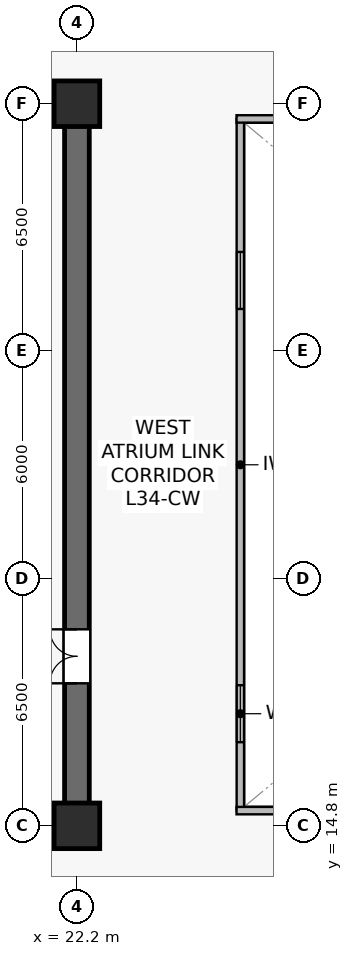
"""IFC4 building model, lengths in metres.
Left out: names, types, materials, properties, quantities, classifications, styles, units other than length and angle.
Written with IfcOpenShell. Run it as: python <this file> out.ifc"""

import sys

from ifc_helpers import new_model, si_unit, direction, frame, frame_2d, origin, origin_2d, place, context, subcontext, project, spatial, rectangle, extrude, source, transform, mapped, element, fill, save


model = new_model("IFC4")
c1 = context("Model", 3, precision=1e-05, world=origin(), true_north=direction((0.0, 1.0)))
c2 = subcontext(c1, "Body", "Model", "MODEL_VIEW")
j1 = project(units=[si_unit("LENGTHUNIT", "METRE"), si_unit("PLANEANGLEUNIT", "RADIAN")], contexts=[c1])
p1 = place(None, origin())
s1 = spatial("IfcSite", under=j1, at=p1, CompositionType="ELEMENT")
p2 = place(p1, origin())
s2 = spatial("IfcBuilding", under=s1, at=p2, CompositionType="ELEMENT")
p3 = place(p2, frame((0.0, 0.0, 142.0)))
s3 = spatial("IfcBuildingStorey", under=s2, at=p3, CompositionType="ELEMENT", Elevation=142.0)
p4 = place(p3, frame((7.075, 14.8, 0.0), z_axis=(0.0, 0.0, 1.0), x_axis=(1.0, 0.0, 0.0)))
e1 = element("IfcWall", 1, at=p4, inside=s3, PredefinedType="SHEAR", context=c2, shape_type="SweptSolid", body=[
    extrude(rectangle(XDim=15.45, YDim=0.65, at=frame_2d((7.725, 0.0))), origin(), (0.0, 0.0, 1.0), 3.79),
])
p5 = place(p3, frame((7.075, 33.8, 0.0), z_axis=(0.0, 0.0, 1.0), x_axis=(1.0, 0.0, 0.0)))
e2 = element("IfcWall", 2, at=p5, inside=s3, PredefinedType="SHEAR", context=c2, shape_type="SweptSolid", body=[
    extrude(rectangle(XDim=15.45, YDim=0.65, at=frame_2d((7.725, 0.0))), origin(), (0.0, 0.0, 1.0), 3.79),
])
p6 = place(p5, frame((8.375, 0.0, 0.0)))
e3 = element("IfcOpeningElement", 3, at=p6, cuts=e2, PredefinedType="OPENING", context=c2, shape_type="SweptSolid", body=[
    extrude(rectangle(XDim=0.95, YDim=2.15, at=frame_2d((0.475, 1.075))), frame((0.0, 0.335, 0.0), z_axis=(0.0, -1.0, 0.0), x_axis=(1.0, 0.0, 0.0)), (0.0, 0.0, 1.0), 0.67),
])
p7 = place(p5, frame((11.915, 0.0, 0.0)))
e4 = element("IfcOpeningElement", 4, at=p7, cuts=e2, PredefinedType="OPENING", context=c2, shape_type="SweptSolid", body=[
    extrude(rectangle(XDim=0.95, YDim=2.15, at=frame_2d((0.475, 1.075))), frame((0.0, 0.335, 0.0), z_axis=(0.0, -1.0, 0.0), x_axis=(1.0, 0.0, 0.0)), (0.0, 0.0, 1.0), 0.67),
])
p8 = place(p3, frame((22.2, 15.125, 0.0), z_axis=(0.0, 0.0, 1.0), x_axis=(0.0, 1.0, 0.0)))
e5 = element("IfcWall", 5, at=p8, inside=s3, PredefinedType="SHEAR", context=c2, shape_type="SweptSolid", body=[
    extrude(rectangle(XDim=18.35, YDim=0.65, at=frame_2d((9.175, 0.0))), origin(), (0.0, 0.0, 1.0), 3.79),
])
p9 = place(p8, frame((3.425, 0.0, 0.0)))
e6 = element("IfcOpeningElement", 6, at=p9, cuts=e5, PredefinedType="OPENING", context=c2, shape_type="SweptSolid", body=[
    extrude(rectangle(XDim=1.42, YDim=2.2, at=frame_2d((0.71, 1.1))), frame((0.0, 0.335, 0.0), z_axis=(0.0, -1.0, 0.0), x_axis=(1.0, 0.0, 0.0)), (0.0, 0.0, 1.0), 0.67),
])
m1 = source(origin(), c2, "Body", "SweptSolid", [
    extrude(rectangle(XDim=1.2, YDim=1.2, at=origin_2d()), origin(), (0.0, 0.0, 1.0), 4.1),
])
for number, where, z_axis, x_axis in (
    (7, (22.2, 14.8, 0.0), (0.0, 0.0, 1.0), (1.0, 0.0, 0.0)),
    (8, (22.2, 33.8, 0.0), (0.0, 0.0, 1.0), (1.0, 0.0, 0.0)),
):
    element("IfcColumn", number, at=place(p3, frame(where, z_axis=z_axis, x_axis=x_axis)), inside=s3, PredefinedType="COLUMN", context=c2, shape_type="MappedRepresentation", body=[
        mapped(m1, transform((0.0, 0.0, 0.0), scale=1.0)),
    ])
p10 = place(p3, frame((26.5, 15.2, 0.0), z_axis=(0.0, 0.0, 1.0), x_axis=(0.0, 1.0, 0.0)))
e9 = element("IfcWall", 9, at=p10, inside=s3, PredefinedType="SOLIDWALL", context=c2, shape_type="SweptSolid", body=[
    extrude(rectangle(XDim=18.2, YDim=0.195, at=frame_2d((9.1, 0.0))), origin(), (0.0, 0.0, 1.0), 3.79),
])
p11 = place(p10, frame((1.8, 0.0, 0.9)))
e10 = element("IfcOpeningElement", 10, at=p11, cuts=e9, PredefinedType="OPENING", context=c2, shape_type="SweptSolid", body=[
    extrude(rectangle(XDim=1.5, YDim=1.4, at=frame_2d((0.75, 0.7))), frame((0.0, 0.107, 0.0), z_axis=(0.0, -1.0, 0.0), x_axis=(1.0, 0.0, 0.0)), (0.0, 0.0, 1.0), 0.215),
])
p12 = place(p10, frame((13.2, 0.0, 0.9)))
e11 = element("IfcOpeningElement", 11, at=p12, cuts=e9, PredefinedType="OPENING", context=c2, shape_type="SweptSolid", body=[
    extrude(rectangle(XDim=1.5, YDim=1.4, at=frame_2d((0.75, 0.7))), frame((0.0, 0.107, 0.0), z_axis=(0.0, -1.0, 0.0), x_axis=(1.0, 0.0, 0.0)), (0.0, 0.0, 1.0), 0.215),
])
for number, where, z_axis, x_axis in (
    (12, (26.4, 15.2, 0.0), (0.0, 0.0, 1.0), (1.0, 0.0, 0.0)),
    (13, (26.4, 33.4, 0.0), (0.0, 0.0, 1.0), (1.0, 0.0, 0.0)),
):
    element("IfcWall", number, at=place(p3, frame(where, z_axis=z_axis, x_axis=x_axis)), inside=s3, PredefinedType="SOLIDWALL", context=c2, shape_type="SweptSolid", body=[
        extrude(rectangle(XDim=22.0, YDim=0.195, at=frame_2d((11.0, 0.0))), origin(), (0.0, 0.0, 1.0), 3.79),
    ])
m2 = source(origin(), c2, "Body", "SweptSolid", [
    extrude(rectangle(XDim=1.5, YDim=1.4, at=frame_2d((0.75, 0.7))), frame((0.0, 0.03, 0.0), z_axis=(0.0, -1.0, 0.0), x_axis=(1.0, 0.0, 0.0)), (0.0, 0.0, 1.0), 0.06),
])
p13 = place(p11, origin())
e14 = element("IfcWindow", 14, at=p13, inside=s3, PartitioningType="SINGLE_PANEL", PredefinedType="WINDOW", context=c2, shape_type="MappedRepresentation", body=[
    mapped(m2, transform((0.0, 0.0, 0.0), scale=1.0)),
])
fill(e10, e14)
p14 = place(p12, origin())
e15 = element("IfcWindow", 15, at=p14, inside=s3, PartitioningType="SINGLE_PANEL", PredefinedType="WINDOW", context=c2, shape_type="MappedRepresentation", body=[
    mapped(m2, transform((0.0, 0.0, 0.0), scale=1.0)),
])
fill(e11, e15)
m3 = source(origin(), c2, "Body", "SweptSolid", [
    extrude(rectangle(XDim=1.42, YDim=2.2, at=frame_2d((0.71, 1.1))), frame((0.0, 0.025, 0.0), z_axis=(0.0, -1.0, 0.0), x_axis=(1.0, 0.0, 0.0)), (0.0, 0.0, 1.0), 0.05),
])
p15 = place(p9, origin())
e16 = element("IfcDoor", 16, at=p15, inside=s3, OperationType="DOUBLE_DOOR_SINGLE_SWING", PredefinedType="DOOR", context=c2, shape_type="MappedRepresentation", body=[
    mapped(m3, transform((0.0, 0.0, 0.0), scale=1.0)),
])
fill(e6, e16)
save(model, sys.argv[1])
